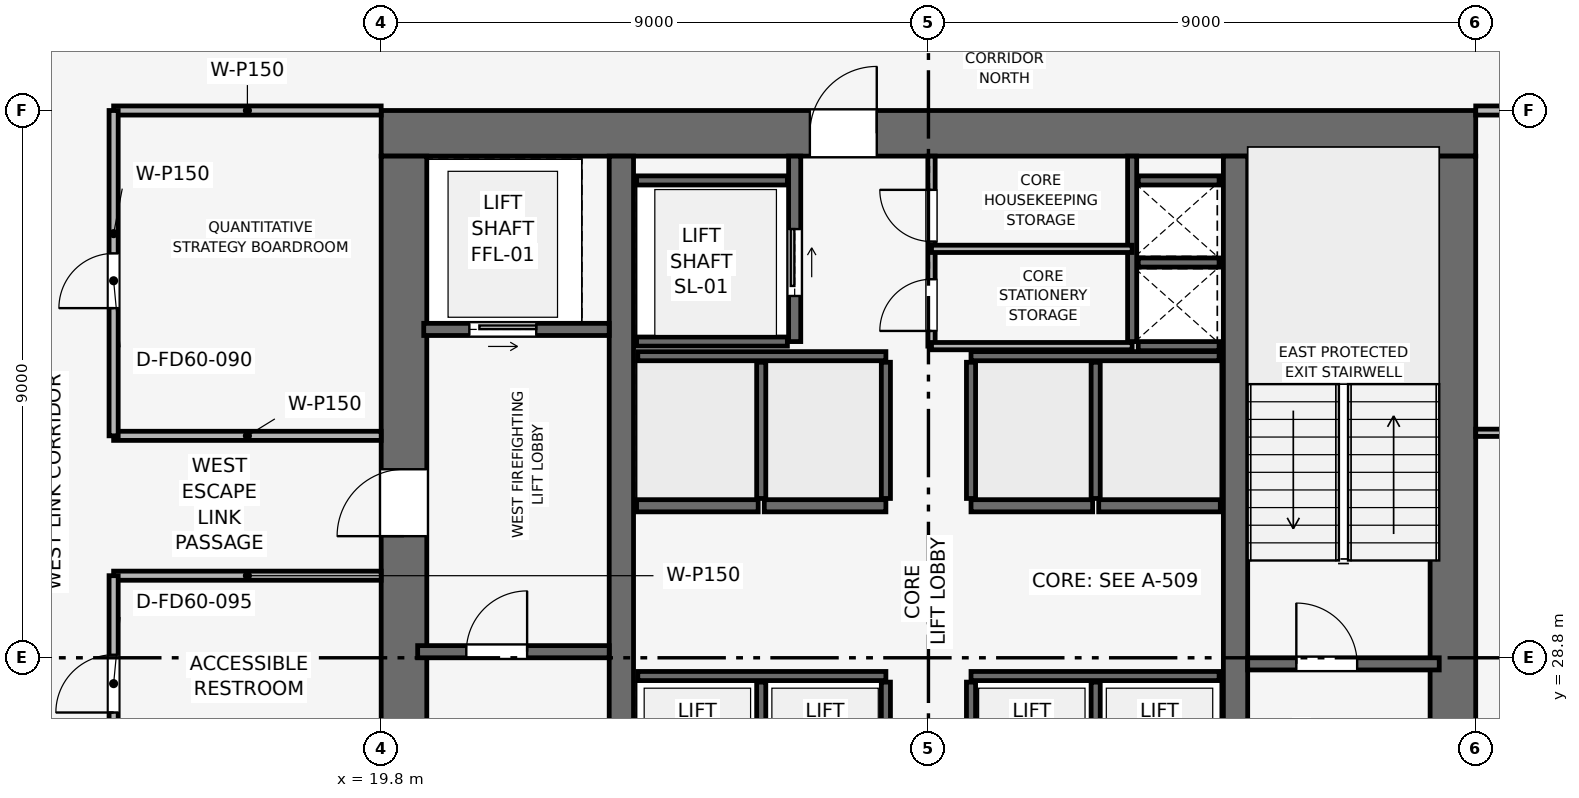
"""IFC4 building model, lengths in metres.
Left out: names, types, materials, properties, quantities, classifications, styles, units other than length and angle.
Written with IfcOpenShell. Run it as: python <this file> out.ifc"""

import sys

from ifc_helpers import new_model, si_unit, direction, frame, frame_2d, origin, place, context, subcontext, project, spatial, rectangle, extrude, element, fill, save


model = new_model("IFC4")
c1 = context("Model", 3, precision=1e-05, world=origin(), true_north=direction((0.0, 1.0)))
c2 = subcontext(c1, "Body", "Model", "MODEL_VIEW")
j1 = project(units=[si_unit("LENGTHUNIT", "METRE"), si_unit("PLANEANGLEUNIT", "RADIAN")], contexts=[c1])
p1 = place(None, origin())
s1 = spatial("IfcSite", under=j1, at=p1, CompositionType="ELEMENT")
p2 = place(p1, origin())
s2 = spatial("IfcBuilding", under=s1, at=p2, CompositionType="ELEMENT")
p3 = place(p2, frame((0.0, 0.0, 222.45)))
s3 = spatial("IfcBuildingStorey", under=s2, at=p3, CompositionType="ELEMENT", Elevation=222.45)
p4 = place(p3, frame((19.8, 37.425, 0.0), z_axis=(0.0, 0.0, 1.0), x_axis=(1.0, 0.0, 0.0)))
e1 = element("IfcWall", 1, at=p4, inside=s3, PredefinedType="SHEAR", context=c2, shape_type="SweptSolid", body=[
    extrude(rectangle(XDim=18.0, YDim=0.75, at=frame_2d((9.0, 0.0))), origin(), (0.0, 0.0, 1.0), 3.75),
])
p5 = place(p4, frame((7.05, 0.0, 0.0)))
e2 = element("IfcOpeningElement", 2, at=p5, cuts=e1, PredefinedType="OPENING", context=c2, shape_type="SweptSolid", body=[
    extrude(rectangle(XDim=1.1, YDim=2.15, at=frame_2d((0.55, 1.075))), frame((0.0, 0.385, 0.0), z_axis=(0.0, -1.0, 0.0), x_axis=(1.0, 0.0, 0.0)), (0.0, 0.0, 1.0), 0.77),
])
p6 = place(p3, frame((20.175, 20.55, 0.0), z_axis=(0.0, 0.0, 1.0), x_axis=(0.0, 1.0, 0.0)))
e3 = element("IfcWall", 3, at=p6, inside=s3, PredefinedType="SHEAR", context=c2, shape_type="SweptSolid", body=[
    extrude(rectangle(XDim=16.5, YDim=0.75, at=frame_2d((8.25, 0.0))), origin(), (0.0, 0.0, 1.0), 3.75),
])
p7 = place(p6, frame((10.25, 0.0, 0.0)))
e4 = element("IfcOpeningElement", 4, at=p7, cuts=e3, PredefinedType="OPENING", context=c2, shape_type="SweptSolid", body=[
    extrude(rectangle(XDim=1.1, YDim=2.15, at=frame_2d((0.55, 1.075))), frame((0.0, 0.385, 0.0), z_axis=(0.0, -1.0, 0.0), x_axis=(1.0, 0.0, 0.0)), (0.0, 0.0, 1.0), 0.77),
])
p8 = place(p3, frame((37.425, 20.55, 0.0), z_axis=(0.0, 0.0, 1.0), x_axis=(0.0, 1.0, 0.0)))
e5 = element("IfcWall", 5, at=p8, inside=s3, PredefinedType="SHEAR", context=c2, shape_type="SweptSolid", body=[
    extrude(rectangle(XDim=16.5, YDim=0.75, at=frame_2d((8.25, 0.0))), origin(), (0.0, 0.0, 1.0), 3.75),
])
p9 = place(p8, frame((4.75, 0.0, 0.0)))
e6 = element("IfcOpeningElement", 6, at=p9, cuts=e5, PredefinedType="OPENING", context=c2, shape_type="SweptSolid", body=[
    extrude(rectangle(XDim=1.1, YDim=2.15, at=frame_2d((0.55, 1.075))), frame((0.0, 0.385, 0.0), z_axis=(0.0, -1.0, 0.0), x_axis=(1.0, 0.0, 0.0)), (0.0, 0.0, 1.0), 0.77),
])
for number, where, z_axis, x_axis in (
    (7, (23.75, 20.55, 0.0), (0.0, 0.0, 1.0), (0.0, 1.0, 0.0)),
    (8, (33.85, 20.55, 0.0), (0.0, 0.0, 1.0), (0.0, 1.0, 0.0)),
):
    element("IfcWall", number, at=place(p3, frame(where, z_axis=z_axis, x_axis=x_axis)), inside=s3, PredefinedType="SHEAR", context=c2, shape_type="SweptSolid", body=[
        extrude(rectangle(XDim=16.5, YDim=0.4, at=frame_2d((8.25, 0.0))), origin(), (0.0, 0.0, 1.0), 3.75),
    ])
p10 = place(p3, frame((20.4, 28.9, 0.0), z_axis=(0.0, 0.0, 1.0), x_axis=(1.0, 0.0, 0.0)))
e9 = element("IfcWall", 9, at=p10, inside=s3, PredefinedType="SHEAR", context=c2, shape_type="SweptSolid", body=[
    extrude(rectangle(XDim=3.15, YDim=0.2, at=frame_2d((1.575, 0.0))), origin(), (0.0, 0.0, 1.0), 3.5),
])
p11 = place(p10, frame((0.8, 0.0, 0.0)))
e10 = element("IfcOpeningElement", 10, at=p11, cuts=e9, PredefinedType="OPENING", context=c2, shape_type="SweptSolid", body=[
    extrude(rectangle(XDim=1.0, YDim=2.1, at=frame_2d((0.5, 1.05))), frame((0.0, 0.11, 0.0), z_axis=(0.0, -1.0, 0.0), x_axis=(1.0, 0.0, 0.0)), (0.0, 0.0, 1.0), 0.22),
])
p12 = place(p3, frame((34.05, 28.7, 0.0), z_axis=(0.0, 0.0, 1.0), x_axis=(1.0, 0.0, 0.0)))
e11 = element("IfcWall", 11, at=p12, inside=s3, PredefinedType="SHEAR", context=c2, shape_type="SweptSolid", body=[
    extrude(rectangle(XDim=3.15, YDim=0.2, at=frame_2d((1.575, 0.0))), origin(), (0.0, 0.0, 1.0), 3.5),
])
p13 = place(p12, frame((0.8, 0.0, 0.0)))
e12 = element("IfcOpeningElement", 12, at=p13, cuts=e11, PredefinedType="OPENING", context=c2, shape_type="SweptSolid", body=[
    extrude(rectangle(XDim=1.0, YDim=2.1, at=frame_2d((0.5, 1.05))), frame((0.0, 0.11, 0.0), z_axis=(0.0, -1.0, 0.0), x_axis=(1.0, 0.0, 0.0)), (0.0, 0.0, 1.0), 0.22),
])
p14 = place(p3, frame((32.15, 34.0, 0.0), z_axis=(0.0, 0.0, 1.0), x_axis=(0.0, 1.0, 0.0)))
e13 = element("IfcWall", 13, at=p14, inside=s3, PredefinedType="SHEAR", context=c2, shape_type="SweptSolid", body=[
    extrude(rectangle(XDim=3.05, YDim=0.15, at=frame_2d((1.525, 0.0))), origin(), (0.0, 0.0, 1.0), 3.5),
])
for number, where, z_axis, x_axis in (
    (14, (32.25, 33.925, 0.0), (0.0, 0.0, 1.0), (1.0, 0.0, 0.0)),
    (15, (32.25, 35.3, 0.0), (0.0, 0.0, 1.0), (1.0, 0.0, 0.0)),
):
    element("IfcWall", number, at=place(p3, frame(where, z_axis=z_axis, x_axis=x_axis)), inside=s3, PredefinedType="SHEAR", context=c2, shape_type="SweptSolid", body=[
        extrude(rectangle(XDim=1.33, YDim=0.15, at=frame_2d((0.665, 0.0))), origin(), (0.0, 0.0, 1.0), 3.5),
    ])
p15 = place(p3, frame((20.5, 34.2, 0.0), z_axis=(0.0, 0.0, 1.0), x_axis=(1.0, 0.0, 0.0)))
e16 = element("IfcWall", 16, at=p15, inside=s3, PredefinedType="SHEAR", context=c2, shape_type="SweptSolid", body=[
    extrude(rectangle(XDim=3.05, YDim=0.2, at=frame_2d((1.525, 0.0))), origin(), (0.0, 0.0, 1.0), 3.5),
])
p16 = place(p15, frame((0.75, 0.0, 0.0)))
e17 = element("IfcOpeningElement", 17, at=p16, cuts=e16, PredefinedType="OPENING", context=c2, shape_type="SweptSolid", body=[
    extrude(rectangle(XDim=1.1, YDim=2.15, at=frame_2d((0.55, 1.075))), frame((0.0, 0.11, 0.0), z_axis=(0.0, -1.0, 0.0), x_axis=(1.0, 0.0, 0.0)), (0.0, 0.0, 1.0), 0.22),
])
p17 = place(p3, frame((26.6, 34.0, 0.0), z_axis=(0.0, 0.0, 1.0), x_axis=(0.0, 1.0, 0.0)))
e18 = element("IfcWall", 18, at=p17, inside=s3, PredefinedType="SHEAR", context=c2, shape_type="SweptSolid", body=[
    extrude(rectangle(XDim=3.05, YDim=0.2, at=frame_2d((1.525, 0.0))), origin(), (0.0, 0.0, 1.0), 3.5),
])
p18 = place(p17, frame((0.75, 0.0, 0.0)))
e19 = element("IfcOpeningElement", 19, at=p18, cuts=e18, PredefinedType="OPENING", context=c2, shape_type="SweptSolid", body=[
    extrude(rectangle(XDim=1.1, YDim=2.15, at=frame_2d((0.55, 1.075))), frame((0.0, 0.11, 0.0), z_axis=(0.0, -1.0, 0.0), x_axis=(1.0, 0.0, 0.0)), (0.0, 0.0, 1.0), 0.22),
])
for number, where, z_axis, x_axis in (
    (20, (24.0, 34.0, 0.0), (0.0, 0.0, 1.0), (1.0, 0.0, 0.0)),
    (21, (24.0, 36.65, 0.0), (0.0, 0.0, 1.0), (1.0, 0.0, 0.0)),
):
    element("IfcWall", number, at=place(p3, frame(where, z_axis=z_axis, x_axis=x_axis)), inside=s3, PredefinedType="SHEAR", context=c2, shape_type="SweptSolid", body=[
        extrude(rectangle(XDim=2.48, YDim=0.15, at=frame_2d((1.24, 0.0))), origin(), (0.0, 0.0, 1.0), 3.5),
    ])
for number, where, z_axis, x_axis in (
    (22, (24.0, 31.3, 0.0), (0.0, 0.0, 1.0), (1.0, 0.0, 0.0)),
    (23, (26.1, 31.3, 0.0), (0.0, 0.0, 1.0), (1.0, 0.0, 0.0)),
    (24, (29.5, 31.3, 0.0), (0.0, 0.0, 1.0), (1.0, 0.0, 0.0)),
    (25, (31.6, 31.3, 0.0), (0.0, 0.0, 1.0), (1.0, 0.0, 0.0)),
):
    element("IfcWall", number, at=place(p3, frame(where, z_axis=z_axis, x_axis=x_axis)), inside=s3, PredefinedType="SHEAR", context=c2, shape_type="SweptSolid", body=[
        extrude(rectangle(XDim=2.0, YDim=0.2, at=frame_2d((1.0, 0.0))), origin(), (0.0, 0.0, 1.0), 3.5),
    ])
p19 = place(p3, frame((32.25, 36.65, 0.0), z_axis=(0.0, 0.0, 1.0), x_axis=(1.0, 0.0, 0.0)))
e26 = element("IfcWall", 26, at=p19, inside=s3, PredefinedType="SHEAR", context=c2, shape_type="SweptSolid", body=[
    extrude(rectangle(XDim=1.33, YDim=0.15, at=frame_2d((0.665, 0.0))), origin(), (0.0, 0.0, 1.0), 3.5),
])
for number, where, z_axis, x_axis in (
    (27, (24.02, 28.5, 0.0), (0.0, 0.0, 1.0), (1.0, 0.0, 0.0)),
    (28, (29.5, 28.5, 0.0), (0.0, 0.0, 1.0), (1.0, 0.0, 0.0)),
):
    element("IfcWall", number, at=place(p3, frame(where, z_axis=z_axis, x_axis=x_axis)), inside=s3, PredefinedType="SHEAR", context=c2, shape_type="SweptSolid", body=[
        extrude(rectangle(XDim=4.08, YDim=0.15, at=frame_2d((2.04, 0.0))), origin(), (0.0, 0.0, 1.0), 3.5),
    ])
for number, where, z_axis, x_axis in (
    (29, (26.05, 26.12, 0.0), (0.0, 0.0, 1.0), (0.0, 1.0, 0.0)),
    (30, (28.1, 26.12, 0.0), (0.0, 0.0, 1.0), (0.0, 1.0, 0.0)),
    (31, (29.5, 26.12, 0.0), (0.0, 0.0, 1.0), (0.0, 1.0, 0.0)),
    (32, (31.55, 26.12, 0.0), (0.0, 0.0, 1.0), (0.0, 1.0, 0.0)),
):
    element("IfcWall", number, at=place(p3, frame(where, z_axis=z_axis, x_axis=x_axis)), inside=s3, PredefinedType="SHEAR", context=c2, shape_type="SweptSolid", body=[
        extrude(rectangle(XDim=2.28, YDim=0.15, at=frame_2d((1.14, 0.0))), origin(), (0.0, 0.0, 1.0), 3.5),
    ])
for number, where, z_axis, x_axis in (
    (33, (24.02, 33.76, 0.0), (0.0, 0.0, 1.0), (1.0, 0.0, 0.0)),
    (34, (29.5, 33.76, 0.0), (0.0, 0.0, 1.0), (1.0, 0.0, 0.0)),
):
    element("IfcWall", number, at=place(p3, frame(where, z_axis=z_axis, x_axis=x_axis)), inside=s3, PredefinedType="SHEAR", context=c2, shape_type="SweptSolid", body=[
        extrude(rectangle(XDim=4.08, YDim=0.15, at=frame_2d((2.04, 0.0))), origin(), (0.0, 0.0, 1.0), 3.5),
    ])
for number, where, z_axis, x_axis in (
    (35, (26.05, 31.42, 0.0), (0.0, 0.0, 1.0), (0.0, 1.0, 0.0)),
    (36, (28.1, 31.42, 0.0), (0.0, 0.0, 1.0), (0.0, 1.0, 0.0)),
    (37, (29.5, 31.42, 0.0), (0.0, 0.0, 1.0), (0.0, 1.0, 0.0)),
    (38, (31.55, 31.42, 0.0), (0.0, 0.0, 1.0), (0.0, 1.0, 0.0)),
):
    element("IfcWall", number, at=place(p3, frame(where, z_axis=z_axis, x_axis=x_axis)), inside=s3, PredefinedType="SHEAR", context=c2, shape_type="SweptSolid", body=[
        extrude(rectangle(XDim=2.24, YDim=0.15, at=frame_2d((1.12, 0.0))), origin(), (0.0, 0.0, 1.0), 3.5),
    ])
p20 = place(p3, frame((28.85, 33.925, 0.0), z_axis=(0.0, 0.0, 1.0), x_axis=(0.0, 1.0, 0.0)))
e39 = element("IfcWall", 39, at=p20, inside=s3, PredefinedType="PARTITIONING", context=c2, shape_type="SweptSolid", body=[
    extrude(rectangle(XDim=3.125, YDim=0.12, at=frame_2d((1.562, 0.0))), origin(), (0.0, 0.0, 1.0), 3.5),
])
p21 = place(p20, frame((0.25, 0.0, 0.0)))
e40 = element("IfcOpeningElement", 40, at=p21, cuts=e39, PredefinedType="OPENING", context=c2, shape_type="SweptSolid", body=[
    extrude(rectangle(XDim=0.85, YDim=2.1, at=frame_2d((0.425, 1.05))), frame((0.0, 0.07, 0.0), z_axis=(0.0, -1.0, 0.0), x_axis=(1.0, 0.0, 0.0)), (0.0, 0.0, 1.0), 0.14),
])
p22 = place(p20, frame((1.72, 0.0, 0.0)))
e41 = element("IfcOpeningElement", 41, at=p22, cuts=e39, PredefinedType="OPENING", context=c2, shape_type="SweptSolid", body=[
    extrude(rectangle(XDim=0.85, YDim=2.1, at=frame_2d((0.425, 1.05))), frame((0.0, 0.07, 0.0), z_axis=(0.0, -1.0, 0.0), x_axis=(1.0, 0.0, 0.0)), (0.0, 0.0, 1.0), 0.14),
])
for number, where, z_axis, x_axis in (
    (42, (28.85, 35.525, 0.0), (0.0, 0.0, 1.0), (1.0, 0.0, 0.0)),
    (43, (28.85, 33.925, 0.0), (0.0, 0.0, 1.0), (1.0, 0.0, 0.0)),
):
    element("IfcWall", number, at=place(p3, frame(where, z_axis=z_axis, x_axis=x_axis)), inside=s3, PredefinedType="PARTITIONING", context=c2, shape_type="SweptSolid", body=[
        extrude(rectangle(XDim=3.3, YDim=0.12, at=frame_2d((1.65, 0.0))), origin(), (0.0, 0.0, 1.0), 3.5),
    ])
for number, where, z_axis, x_axis in (
    (44, (15.4, 30.15, 0.0), (0.0, 0.0, 1.0), (1.0, 0.0, 0.0)),
    (45, (15.4, 32.45, 0.0), (0.0, 0.0, 1.0), (1.0, 0.0, 0.0)),
):
    element("IfcWall", number, at=place(p3, frame(where, z_axis=z_axis, x_axis=x_axis)), inside=s3, PredefinedType="PARTITIONING", context=c2, shape_type="SweptSolid", body=[
        extrude(rectangle(XDim=4.4, YDim=0.15, at=frame_2d((2.2, 0.0))), origin(), (0.0, 0.0, 1.0), 3.5),
    ])
p23 = place(p3, frame((15.4, 37.8, 0.0), z_axis=(0.0, 0.0, 1.0), x_axis=(1.0, 0.0, 0.0)))
e46 = element("IfcWall", 46, at=p23, inside=s3, PredefinedType="PARTITIONING", context=c2, shape_type="SweptSolid", body=[
    extrude(rectangle(XDim=4.4, YDim=0.15, at=frame_2d((2.2, 0.0))), origin(), (0.0, 0.0, 1.0), 3.035),
])
p24 = place(p3, frame((15.4, 19.8, 0.0), z_axis=(0.0, 0.0, 1.0), x_axis=(0.0, 1.0, 0.0)))
e47 = element("IfcWall", 47, at=p24, inside=s3, PredefinedType="PARTITIONING", context=c2, shape_type="SweptSolid", body=[
    extrude(rectangle(XDim=10.35, YDim=0.15, at=frame_2d((5.175, 0.0))), origin(), (0.0, 0.0, 1.0), 3.035),
])
p25 = place(p24, frame((1.2, 0.0, 0.0)))
e48 = element("IfcOpeningElement", 48, at=p25, cuts=e47, PredefinedType="OPENING", context=c2, shape_type="SweptSolid", body=[
    extrude(rectangle(XDim=0.9, YDim=2.1, at=frame_2d((0.45, 1.05))), frame((0.0, 0.085, 0.0), z_axis=(0.0, -1.0, 0.0), x_axis=(1.0, 0.0, 0.0)), (0.0, 0.0, 1.0), 0.17),
])
p26 = place(p24, frame((4.7, 0.0, 0.0)))
e49 = element("IfcOpeningElement", 49, at=p26, cuts=e47, PredefinedType="OPENING", context=c2, shape_type="SweptSolid", body=[
    extrude(rectangle(XDim=0.9, YDim=2.1, at=frame_2d((0.45, 1.05))), frame((0.0, 0.085, 0.0), z_axis=(0.0, -1.0, 0.0), x_axis=(1.0, 0.0, 0.0)), (0.0, 0.0, 1.0), 0.17),
])
p27 = place(p24, frame((8.1, 0.0, 0.0)))
e50 = element("IfcOpeningElement", 50, at=p27, cuts=e47, PredefinedType="OPENING", context=c2, shape_type="SweptSolid", body=[
    extrude(rectangle(XDim=0.95, YDim=2.1, at=frame_2d((0.475, 1.05))), frame((0.0, 0.085, 0.0), z_axis=(0.0, -1.0, 0.0), x_axis=(1.0, 0.0, 0.0)), (0.0, 0.0, 1.0), 0.17),
])
p28 = place(p3, frame((15.4, 32.45, 0.0), z_axis=(0.0, 0.0, 1.0), x_axis=(0.0, 1.0, 0.0)))
e51 = element("IfcWall", 51, at=p28, inside=s3, PredefinedType="PARTITIONING", context=c2, shape_type="SweptSolid", body=[
    extrude(rectangle(XDim=5.35, YDim=0.15, at=frame_2d((2.675, 0.0))), origin(), (0.0, 0.0, 1.0), 3.035),
])
p29 = place(p28, frame((2.1, 0.0, 0.0)))
e52 = element("IfcOpeningElement", 52, at=p29, cuts=e51, PredefinedType="OPENING", context=c2, shape_type="SweptSolid", body=[
    extrude(rectangle(XDim=0.9, YDim=2.1, at=frame_2d((0.45, 1.05))), frame((0.0, 0.085, 0.0), z_axis=(0.0, -1.0, 0.0), x_axis=(1.0, 0.0, 0.0)), (0.0, 0.0, 1.0), 0.17),
])
p30 = place(p3, frame((37.8, 32.5, 0.0), z_axis=(0.0, 0.0, 1.0), x_axis=(1.0, 0.0, 0.0)))
e53 = element("IfcWall", 53, at=p30, inside=s3, PredefinedType="PARTITIONING", context=c2, shape_type="SweptSolid", body=[
    extrude(rectangle(XDim=17.87, YDim=0.12, at=frame_2d((8.935, 0.0))), origin(), (0.0, 0.0, 1.0), 2.885),
])
p31 = place(p3, frame((37.8, 37.8, 0.0), z_axis=(0.0, 0.0, 1.0), x_axis=(1.0, 0.0, 0.0)))
e54 = element("IfcWall", 54, at=p31, inside=s3, PredefinedType="PARTITIONING", context=c2, shape_type="SweptSolid", body=[
    extrude(rectangle(XDim=17.87, YDim=0.15, at=frame_2d((8.935, 0.0))), origin(), (0.0, 0.0, 1.0), 2.885),
])
p32 = place(p31, frame((3.4, 0.0, 0.0)))
e55 = element("IfcOpeningElement", 55, at=p32, cuts=e54, PredefinedType="OPENING", context=c2, shape_type="SweptSolid", body=[
    extrude(rectangle(XDim=0.9, YDim=2.1, at=frame_2d((0.45, 1.05))), frame((0.0, 0.085, 0.0), z_axis=(0.0, -1.0, 0.0), x_axis=(1.0, 0.0, 0.0)), (0.0, 0.0, 1.0), 0.17),
])
p33 = place(p11, origin())
e56 = element("IfcDoor", 56, at=p33, inside=s3, OperationType="SINGLE_SWING_RIGHT", PredefinedType="DOOR", context=c2, shape_type="SweptSolid", body=[
    extrude(rectangle(XDim=1.0, YDim=2.1, at=frame_2d((0.5, 1.05))), frame((0.0, 0.025, 0.0), z_axis=(0.0, -1.0, 0.0), x_axis=(1.0, 0.0, 0.0)), (0.0, 0.0, 1.0), 0.05),
])
fill(e10, e56)
p34 = place(p13, origin())
e57 = element("IfcDoor", 57, at=p34, inside=s3, OperationType="SINGLE_SWING_LEFT", PredefinedType="DOOR", context=c2, shape_type="SweptSolid", body=[
    extrude(rectangle(XDim=1.0, YDim=2.1, at=frame_2d((0.5, 1.05))), frame((0.0, 0.025, 0.0), z_axis=(0.0, -1.0, 0.0), x_axis=(1.0, 0.0, 0.0)), (0.0, 0.0, 1.0), 0.05),
])
fill(e12, e57)
p35 = place(p16, origin())
e58 = element("IfcDoor", 58, at=p35, inside=s3, OperationType="SLIDING_TO_RIGHT", PredefinedType="DOOR", context=c2, shape_type="SweptSolid", body=[
    extrude(rectangle(XDim=1.1, YDim=2.15, at=frame_2d((0.55, 1.075))), frame((0.0, 0.025, 0.0), z_axis=(0.0, -1.0, 0.0), x_axis=(1.0, 0.0, 0.0)), (0.0, 0.0, 1.0), 0.05),
])
fill(e17, e58)
p36 = place(p18, origin())
e59 = element("IfcDoor", 59, at=p36, inside=s3, OperationType="SLIDING_TO_RIGHT", PredefinedType="DOOR", context=c2, shape_type="SweptSolid", body=[
    extrude(rectangle(XDim=1.1, YDim=2.15, at=frame_2d((0.55, 1.075))), frame((0.0, 0.025, 0.0), z_axis=(0.0, -1.0, 0.0), x_axis=(1.0, 0.0, 0.0)), (0.0, 0.0, 1.0), 0.05),
])
fill(e19, e59)
p37 = place(p21, origin())
e60 = element("IfcDoor", 60, at=p37, inside=s3, OperationType="SINGLE_SWING_LEFT", PredefinedType="DOOR", context=c2, shape_type="SweptSolid", body=[
    extrude(rectangle(XDim=0.85, YDim=2.1, at=frame_2d((0.425, 1.05))), frame((0.0, 0.025, 0.0), z_axis=(0.0, -1.0, 0.0), x_axis=(1.0, 0.0, 0.0)), (0.0, 0.0, 1.0), 0.05),
])
fill(e40, e60)
p38 = place(p22, origin())
e61 = element("IfcDoor", 61, at=p38, inside=s3, OperationType="SINGLE_SWING_RIGHT", PredefinedType="DOOR", context=c2, shape_type="SweptSolid", body=[
    extrude(rectangle(XDim=0.85, YDim=2.1, at=frame_2d((0.425, 1.05))), frame((0.0, 0.025, 0.0), z_axis=(0.0, -1.0, 0.0), x_axis=(1.0, 0.0, 0.0)), (0.0, 0.0, 1.0), 0.05),
])
fill(e41, e61)
p39 = place(p27, origin())
e62 = element("IfcDoor", 62, at=p39, inside=s3, OperationType="SINGLE_SWING_LEFT", PredefinedType="DOOR", context=c2, shape_type="SweptSolid", body=[
    extrude(rectangle(XDim=0.95, YDim=2.1, at=frame_2d((0.475, 1.05))), frame((0.0, 0.025, 0.0), z_axis=(0.0, -1.0, 0.0), x_axis=(1.0, 0.0, 0.0)), (0.0, 0.0, 1.0), 0.05),
])
fill(e50, e62)
p40 = place(p29, origin())
e63 = element("IfcDoor", 63, at=p40, inside=s3, OperationType="SINGLE_SWING_LEFT", PredefinedType="DOOR", context=c2, shape_type="SweptSolid", body=[
    extrude(rectangle(XDim=0.9, YDim=2.1, at=frame_2d((0.45, 1.05))), frame((0.0, 0.025, 0.0), z_axis=(0.0, -1.0, 0.0), x_axis=(1.0, 0.0, 0.0)), (0.0, 0.0, 1.0), 0.05),
])
fill(e52, e63)
p41 = place(p7, origin())
e64 = element("IfcDoor", 64, at=p41, inside=s3, OperationType="SINGLE_SWING_LEFT", PredefinedType="DOOR", context=c2, shape_type="SweptSolid", body=[
    extrude(rectangle(XDim=1.1, YDim=2.15, at=frame_2d((0.55, 1.075))), frame((0.0, 0.025, 0.0), z_axis=(0.0, -1.0, 0.0), x_axis=(1.0, 0.0, 0.0)), (0.0, 0.0, 1.0), 0.05),
])
fill(e4, e64)
p42 = place(p5, origin())
e65 = element("IfcDoor", 65, at=p42, inside=s3, OperationType="SINGLE_SWING_RIGHT", PredefinedType="DOOR", context=c2, shape_type="SweptSolid", body=[
    extrude(rectangle(XDim=1.1, YDim=2.15, at=frame_2d((0.55, 1.075))), frame((0.0, 0.025, 0.0), z_axis=(0.0, -1.0, 0.0), x_axis=(1.0, 0.0, 0.0)), (0.0, 0.0, 1.0), 0.05),
])
fill(e2, e65)
save(model, sys.argv[1])
